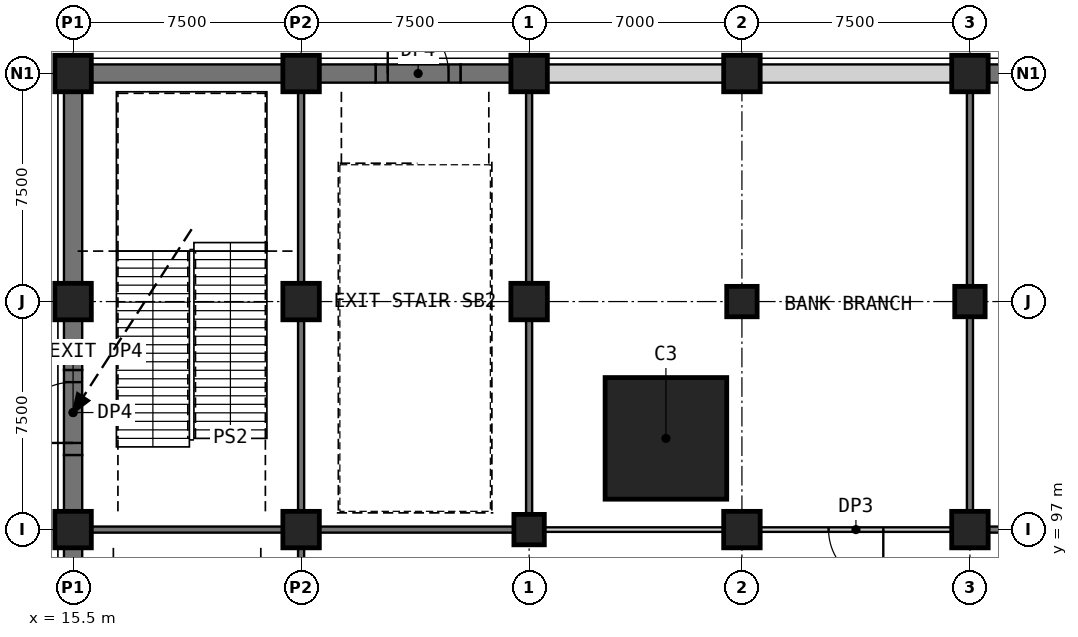
"""IFC4 building model, lengths in metres.
Left out: names, types, materials, properties, quantities, classifications, styles, units other than length and angle.
Written with IfcOpenShell. Run it as: python <this file> out.ifc"""

import sys

from ifc_helpers import new_model, si_unit, direction, frame, frame_2d, origin, origin_2d, place, context, subcontext, project, spatial, rectangle, extrude, element, fill, save


model = new_model("IFC4")
c1 = context("Model", 3, precision=1e-05, world=origin(), true_north=direction((0.0, 1.0)))
c2 = subcontext(c1, "Body", "Model", "MODEL_VIEW")
j1 = project(units=[si_unit("LENGTHUNIT", "METRE"), si_unit("PLANEANGLEUNIT", "RADIAN")], contexts=[c1])
p1 = place(None, origin())
s1 = spatial("IfcSite", under=j1, at=p1, CompositionType="ELEMENT")
p2 = place(p1, origin())
s2 = spatial("IfcBuilding", under=s1, at=p2, CompositionType="ELEMENT")
p3 = place(p2, origin())
s3 = spatial("IfcBuildingStorey", under=s2, at=p3, CompositionType="ELEMENT", Elevation=0.0)
p4 = place(p3, frame((30.5, 97.0, 0.0), z_axis=(0.0, 0.0, 1.0), x_axis=(1.0, 0.0, 0.0)))
e1 = element("IfcColumn", 1, at=p4, inside=s3, PredefinedType="COLUMN", context=c2, shape_type="SweptSolid", body=[
    extrude(rectangle(XDim=1.0, YDim=1.0, at=origin_2d()), origin(), (0.0, 0.0, 1.0), 8.0),
])
p5 = place(p3, frame((37.5, 97.0, 0.0), z_axis=(0.0, 0.0, 1.0), x_axis=(1.0, 0.0, 0.0)))
e2 = element("IfcColumn", 2, at=p5, inside=s3, PredefinedType="COLUMN", context=c2, shape_type="SweptSolid", body=[
    extrude(rectangle(XDim=1.2, YDim=1.2, at=origin_2d()), origin(), (0.0, 0.0, 1.0), 8.0),
])
p6 = place(p3, frame((37.5, 104.5, 0.0), z_axis=(0.0, 0.0, 1.0), x_axis=(1.0, 0.0, 0.0)))
e3 = element("IfcColumn", 3, at=p6, inside=s3, PredefinedType="COLUMN", context=c2, shape_type="SweptSolid", body=[
    extrude(rectangle(XDim=1.0, YDim=1.0, at=origin_2d()), origin(), (0.0, 0.0, 1.0), 8.0),
])
p7 = place(p3, frame((45.0, 97.0, 0.0), z_axis=(0.0, 0.0, 1.0), x_axis=(1.0, 0.0, 0.0)))
e4 = element("IfcColumn", 4, at=p7, inside=s3, PredefinedType="COLUMN", context=c2, shape_type="SweptSolid", body=[
    extrude(rectangle(XDim=1.2, YDim=1.2, at=origin_2d()), origin(), (0.0, 0.0, 1.0), 8.0),
])
p8 = place(p3, frame((45.0, 104.5, 0.0), z_axis=(0.0, 0.0, 1.0), x_axis=(1.0, 0.0, 0.0)))
e5 = element("IfcColumn", 5, at=p8, inside=s3, PredefinedType="COLUMN", context=c2, shape_type="SweptSolid", body=[
    extrude(rectangle(XDim=1.0, YDim=1.0, at=origin_2d()), origin(), (0.0, 0.0, 1.0), 8.0),
])
p9 = place(p3, frame((35.0, 100.0, 0.0), z_axis=(0.0, 0.0, 1.0), x_axis=(1.0, 0.0, 0.0)))
e6 = element("IfcColumn", 6, at=p9, inside=s3, PredefinedType="COLUMN", context=c2, shape_type="SweptSolid", body=[
    extrude(rectangle(XDim=4.0, YDim=4.0, at=origin_2d()), origin(), (0.0, 0.0, 1.0), 8.0),
])
for number, where, z_axis, x_axis in (
    (7, (15.5, 97.0, 0.0), (0.0, 0.0, 1.0), (1.0, 0.0, 0.0)),
    (8, (15.5, 104.5, 0.0), (0.0, 0.0, 1.0), (1.0, 0.0, 0.0)),
    (9, (15.5, 112.0, 0.0), (0.0, 0.0, 1.0), (1.0, 0.0, 0.0)),
    (10, (23.0, 97.0, 0.0), (0.0, 0.0, 1.0), (1.0, 0.0, 0.0)),
    (11, (23.0, 104.5, 0.0), (0.0, 0.0, 1.0), (1.0, 0.0, 0.0)),
    (12, (23.0, 112.0, 0.0), (0.0, 0.0, 1.0), (1.0, 0.0, 0.0)),
    (13, (30.5, 104.5, 0.0), (0.0, 0.0, 1.0), (1.0, 0.0, 0.0)),
    (14, (30.5, 112.0, 0.0), (0.0, 0.0, 1.0), (1.0, 0.0, 0.0)),
    (15, (37.5, 112.0, 0.0), (0.0, 0.0, 1.0), (1.0, 0.0, 0.0)),
    (16, (45.0, 112.0, 0.0), (0.0, 0.0, 1.0), (1.0, 0.0, 0.0)),
):
    element("IfcColumn", number, at=place(p3, frame(where, z_axis=z_axis, x_axis=x_axis)), inside=s3, PredefinedType="COLUMN", context=c2, shape_type="SweptSolid", body=[
        extrude(rectangle(XDim=1.2, YDim=1.2, at=origin_2d()), origin(), (0.0, 0.0, 1.0), 8.0),
    ])
p10 = place(p3, frame((16.1, 97.0, 0.0), z_axis=(0.0, 0.0, 1.0), x_axis=(1.0, 0.0, 0.0)))
e17 = element("IfcWall", 17, at=p10, inside=s3, PredefinedType="SHEAR", context=c2, shape_type="SweptSolid", body=[
    extrude(rectangle(XDim=6.3, YDim=0.2, at=frame_2d((3.15, 0.0))), origin(), (0.0, 0.0, 1.0), 7.7),
])
p11 = place(p3, frame((23.6, 97.0, 0.0), z_axis=(0.0, 0.0, 1.0), x_axis=(1.0, 0.0, 0.0)))
e18 = element("IfcWall", 18, at=p11, inside=s3, PredefinedType="SHEAR", context=c2, shape_type="SweptSolid", body=[
    extrude(rectangle(XDim=6.4, YDim=0.2, at=frame_2d((3.2, 0.0))), origin(), (0.0, 0.0, 1.0), 7.7),
])
p12 = place(p3, frame((31.0, 97.0, 0.0), z_axis=(0.0, 0.0, 1.0), x_axis=(1.0, 0.0, 0.0)))
e19 = element("IfcWall", 19, at=p12, inside=s3, PredefinedType="PARTITIONING", context=c2, shape_type="SweptSolid", body=[
    extrude(rectangle(XDim=5.9, YDim=0.15, at=frame_2d((2.95, 0.0))), origin(), (0.0, 0.0, 1.0), 7.7),
])
p13 = place(p3, frame((44.4, 97.0, 0.0), z_axis=(0.0, 0.0, 1.0), x_axis=(-1.0, 0.0, 0.0)))
e20 = element("IfcWall", 20, at=p13, inside=s3, PredefinedType="PARTITIONING", context=c2, shape_type="SweptSolid", body=[
    extrude(rectangle(XDim=6.3, YDim=0.15, at=frame_2d((3.15, 0.0))), origin(), (0.0, 0.0, 1.0), 7.7),
])
p14 = place(p13, frame((2.25, 0.0, 0.0)))
e21 = element("IfcOpeningElement", 21, at=p14, cuts=e20, PredefinedType="OPENING", context=c2, shape_type="SweptSolid", body=[
    extrude(rectangle(XDim=1.8, YDim=2.4, at=frame_2d((0.9, 1.2))), frame((0.0, 0.085, 0.0), z_axis=(0.0, -1.0, 0.0), x_axis=(1.0, 0.0, 0.0)), (0.0, 0.0, 1.0), 0.17),
])
p15 = place(p3, frame((45.6, 97.0, 0.0), z_axis=(0.0, 0.0, 1.0), x_axis=(1.0, 0.0, 0.0)))
e22 = element("IfcWall", 22, at=p15, inside=s3, PredefinedType="SHEAR", context=c2, shape_type="SweptSolid", body=[
    extrude(rectangle(XDim=6.3, YDim=0.2, at=frame_2d((3.15, 0.0))), origin(), (0.0, 0.0, 1.0), 7.7),
])
p16 = place(p3, frame((16.1, 112.0, 0.0), z_axis=(0.0, 0.0, 1.0), x_axis=(1.0, 0.0, 0.0)))
e23 = element("IfcWall", 23, at=p16, inside=s3, PredefinedType="PARTITIONING", context=c2, shape_type="SweptSolid", body=[
    extrude(rectangle(XDim=6.3, YDim=0.6, at=frame_2d((3.15, 0.0))), origin(), (0.0, 0.0, 1.0), 7.1),
])
p17 = place(p3, frame((25.45, 112.0, 0.0), z_axis=(0.0, 0.0, 1.0), x_axis=(1.0, 0.0, 0.0)))
e24 = element("IfcWall", 24, at=p17, inside=s3, PredefinedType="PARTITIONING", context=c2, shape_type="SweptSolid", body=[
    extrude(rectangle(XDim=2.8, YDim=0.6, at=frame_2d((1.4, 0.0))), origin(), (0.0, 0.0, 1.0), 7.1),
])
p18 = place(p17, frame((0.4, 0.0, 0.0)))
e25 = element("IfcOpeningElement", 25, at=p18, cuts=e24, PredefinedType="OPENING", context=c2, shape_type="SweptSolid", body=[
    extrude(rectangle(XDim=2.0, YDim=2.4, at=frame_2d((1.0, 1.2))), frame((0.0, 0.31, 0.0), z_axis=(0.0, -1.0, 0.0), x_axis=(1.0, 0.0, 0.0)), (0.0, 0.0, 1.0), 0.62),
])
p19 = place(p3, frame((23.6, 112.0, 0.0), z_axis=(0.0, 0.0, 1.0), x_axis=(1.0, 0.0, 0.0)))
e26 = element("IfcWall", 26, at=p19, inside=s3, PredefinedType="PARTITIONING", context=c2, shape_type="SweptSolid", body=[
    extrude(rectangle(XDim=1.85, YDim=0.6, at=frame_2d((0.925, 0.0))), origin(), (0.0, 0.0, 1.0), 7.1),
])
p20 = place(p3, frame((28.25, 112.0, 0.0), z_axis=(0.0, 0.0, 1.0), x_axis=(1.0, 0.0, 0.0)))
e27 = element("IfcWall", 27, at=p20, inside=s3, PredefinedType="PARTITIONING", context=c2, shape_type="SweptSolid", body=[
    extrude(rectangle(XDim=1.65, YDim=0.6, at=frame_2d((0.825, 0.0))), origin(), (0.0, 0.0, 1.0), 7.1),
])
p21 = place(p3, frame((31.1, 112.0, 0.0), z_axis=(0.0, 0.0, 1.0), x_axis=(1.0, 0.0, 0.0)))
e28 = element("IfcWall", 28, at=p21, inside=s3, PredefinedType="PARTITIONING", context=c2, shape_type="SweptSolid", body=[
    extrude(rectangle(XDim=5.8, YDim=0.6, at=frame_2d((2.9, 0.0))), origin(), (0.0, 0.0, 1.0), 7.1),
])
p22 = place(p3, frame((38.1, 112.0, 0.0), z_axis=(0.0, 0.0, 1.0), x_axis=(1.0, 0.0, 0.0)))
e29 = element("IfcWall", 29, at=p22, inside=s3, PredefinedType="PARTITIONING", context=c2, shape_type="SweptSolid", body=[
    extrude(rectangle(XDim=6.3, YDim=0.6, at=frame_2d((3.15, 0.0))), origin(), (0.0, 0.0, 1.0), 7.1),
])
p23 = place(p3, frame((45.6, 112.0, 0.0), z_axis=(0.0, 0.0, 1.0), x_axis=(1.0, 0.0, 0.0)))
e30 = element("IfcWall", 30, at=p23, inside=s3, PredefinedType="PARTITIONING", context=c2, shape_type="SweptSolid", body=[
    extrude(rectangle(XDim=1.85, YDim=0.6, at=frame_2d((0.925, 0.0))), origin(), (0.0, 0.0, 1.0), 7.1),
])
p24 = place(p3, frame((15.5, 95.4, 0.0), z_axis=(0.0, 0.0, 1.0), x_axis=(0.0, 1.0, 0.0)))
e31 = element("IfcWall", 31, at=p24, inside=s3, PredefinedType="PARTITIONING", context=c2, shape_type="SweptSolid", body=[
    extrude(rectangle(XDim=1.0, YDim=0.6, at=frame_2d((0.5, 0.0))), origin(), (0.0, 0.0, 1.0), 7.1),
])
p25 = place(p3, frame((15.5, 99.45, 0.0), z_axis=(0.0, 0.0, 1.0), x_axis=(0.0, 1.0, 0.0)))
e32 = element("IfcWall", 32, at=p25, inside=s3, PredefinedType="PARTITIONING", context=c2, shape_type="SweptSolid", body=[
    extrude(rectangle(XDim=2.8, YDim=0.6, at=frame_2d((1.4, 0.0))), origin(), (0.0, 0.0, 1.0), 7.1),
])
p26 = place(p25, frame((0.4, 0.0, 0.0)))
e33 = element("IfcOpeningElement", 33, at=p26, cuts=e32, PredefinedType="OPENING", context=c2, shape_type="SweptSolid", body=[
    extrude(rectangle(XDim=2.0, YDim=2.4, at=frame_2d((1.0, 1.2))), frame((0.0, 0.31, 0.0), z_axis=(0.0, -1.0, 0.0), x_axis=(1.0, 0.0, 0.0)), (0.0, 0.0, 1.0), 0.62),
])
p27 = place(p3, frame((15.5, 97.6, 0.0), z_axis=(0.0, 0.0, 1.0), x_axis=(0.0, 1.0, 0.0)))
e34 = element("IfcWall", 34, at=p27, inside=s3, PredefinedType="PARTITIONING", context=c2, shape_type="SweptSolid", body=[
    extrude(rectangle(XDim=1.85, YDim=0.6, at=frame_2d((0.925, 0.0))), origin(), (0.0, 0.0, 1.0), 7.1),
])
p28 = place(p3, frame((15.5, 102.25, 0.0), z_axis=(0.0, 0.0, 1.0), x_axis=(0.0, 1.0, 0.0)))
e35 = element("IfcWall", 35, at=p28, inside=s3, PredefinedType="PARTITIONING", context=c2, shape_type="SweptSolid", body=[
    extrude(rectangle(XDim=1.65, YDim=0.6, at=frame_2d((0.825, 0.0))), origin(), (0.0, 0.0, 1.0), 7.1),
])
p29 = place(p3, frame((15.5, 105.1, 0.0), z_axis=(0.0, 0.0, 1.0), x_axis=(0.0, 1.0, 0.0)))
e36 = element("IfcWall", 36, at=p29, inside=s3, PredefinedType="PARTITIONING", context=c2, shape_type="SweptSolid", body=[
    extrude(rectangle(XDim=6.3, YDim=0.6, at=frame_2d((3.15, 0.0))), origin(), (0.0, 0.0, 1.0), 7.1),
])
p30 = place(p3, frame((23.0, 90.6, 0.0), z_axis=(0.0, 0.0, 1.0), x_axis=(0.0, 1.0, 0.0)))
e37 = element("IfcWall", 37, at=p30, inside=s3, PredefinedType="SHEAR", context=c2, shape_type="SweptSolid", body=[
    extrude(rectangle(XDim=5.8, YDim=0.2, at=frame_2d((2.9, 0.0))), origin(), (0.0, 0.0, 1.0), 7.7),
])
for number, where, z_axis, x_axis in (
    (38, (23.0, 97.6, 0.0), (0.0, 0.0, 1.0), (0.0, 1.0, 0.0)),
    (39, (23.0, 105.1, 0.0), (0.0, 0.0, 1.0), (0.0, 1.0, 0.0)),
):
    element("IfcWall", number, at=place(p3, frame(where, z_axis=z_axis, x_axis=x_axis)), inside=s3, PredefinedType="SHEAR", context=c2, shape_type="SweptSolid", body=[
        extrude(rectangle(XDim=6.3, YDim=0.2, at=frame_2d((3.15, 0.0))), origin(), (0.0, 0.0, 1.0), 7.7),
    ])
p31 = place(p3, frame((30.5, 97.5, 0.0), z_axis=(0.0, 0.0, 1.0), x_axis=(0.0, 1.0, 0.0)))
e40 = element("IfcWall", 40, at=p31, inside=s3, PredefinedType="SHEAR", context=c2, shape_type="SweptSolid", body=[
    extrude(rectangle(XDim=6.4, YDim=0.2, at=frame_2d((3.2, 0.0))), origin(), (0.0, 0.0, 1.0), 7.7),
])
p32 = place(p3, frame((30.5, 105.1, 0.0), z_axis=(0.0, 0.0, 1.0), x_axis=(0.0, 1.0, 0.0)))
e41 = element("IfcWall", 41, at=p32, inside=s3, PredefinedType="SHEAR", context=c2, shape_type="SweptSolid", body=[
    extrude(rectangle(XDim=6.3, YDim=0.2, at=frame_2d((3.15, 0.0))), origin(), (0.0, 0.0, 1.0), 7.7),
])
for number, where, z_axis, x_axis in (
    (42, (45.0, 97.6, 0.0), (0.0, 0.0, 1.0), (0.0, 1.0, 0.0)),
    (43, (45.0, 105.0, 0.0), (0.0, 0.0, 1.0), (0.0, 1.0, 0.0)),
):
    element("IfcWall", number, at=place(p3, frame(where, z_axis=z_axis, x_axis=x_axis)), inside=s3, PredefinedType="SHEAR", context=c2, shape_type="SweptSolid", body=[
        extrude(rectangle(XDim=6.4, YDim=0.2, at=frame_2d((3.2, 0.0))), origin(), (0.0, 0.0, 1.0), 7.7),
    ])
p33 = place(p14, origin())
e44 = element("IfcDoor", 44, at=p33, inside=s3, OperationType="SINGLE_SWING_LEFT", PredefinedType="DOOR", context=c2, shape_type="SweptSolid", body=[
    extrude(rectangle(XDim=1.8, YDim=2.4, at=frame_2d((0.9, 1.2))), frame((0.0, 0.025, 0.0), z_axis=(0.0, -1.0, 0.0), x_axis=(1.0, 0.0, 0.0)), (0.0, 0.0, 1.0), 0.05),
])
fill(e21, e44)
p34 = place(p18, origin())
e45 = element("IfcDoor", 45, at=p34, inside=s3, OperationType="SINGLE_SWING_LEFT", PredefinedType="DOOR", context=c2, shape_type="SweptSolid", body=[
    extrude(rectangle(XDim=2.0, YDim=2.4, at=frame_2d((1.0, 1.2))), frame((0.0, 0.025, 0.0), z_axis=(0.0, -1.0, 0.0), x_axis=(1.0, 0.0, 0.0)), (0.0, 0.0, 1.0), 0.05),
])
fill(e25, e45)
p35 = place(p26, origin())
e46 = element("IfcDoor", 46, at=p35, inside=s3, OperationType="SINGLE_SWING_LEFT", PredefinedType="DOOR", context=c2, shape_type="SweptSolid", body=[
    extrude(rectangle(XDim=2.0, YDim=2.4, at=frame_2d((1.0, 1.2))), frame((0.0, 0.025, 0.0), z_axis=(0.0, -1.0, 0.0), x_axis=(1.0, 0.0, 0.0)), (0.0, 0.0, 1.0), 0.05),
])
fill(e33, e46)
save(model, sys.argv[1])
